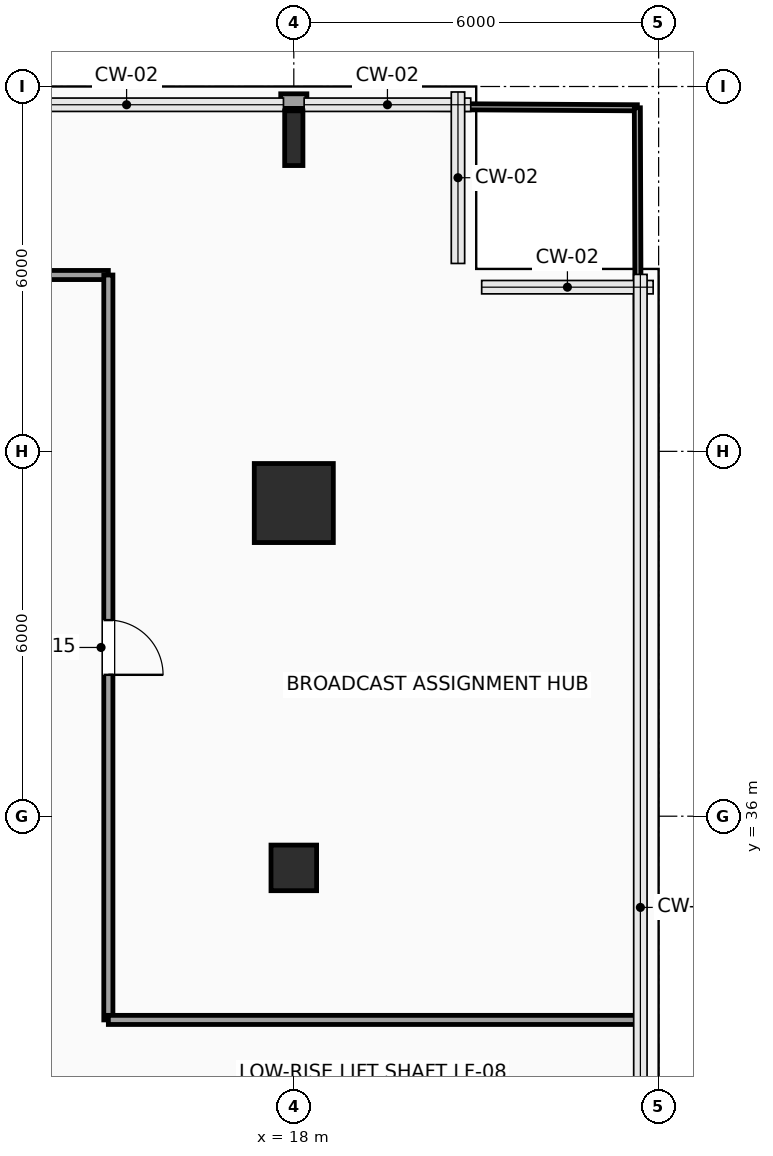
"""IFC4 building model, lengths in metres.
Left out: names, types, materials, properties, quantities, classifications, styles, units other than length and angle.
Written with IfcOpenShell. Run it as: python <this file> out.ifc"""

import sys

from ifc_helpers import new_model, si_unit, direction, frame, frame_2d, origin, origin_2d, place, context, subcontext, project, spatial, rectangle, hollow_rectangle, i_section, extrude, element, fill, save


model = new_model("IFC4")
c1 = context("Model", 3, precision=1e-05, world=origin(), true_north=direction((0.0, 1.0)))
c2 = subcontext(c1, "Body", "Model", "MODEL_VIEW")
j1 = project(units=[si_unit("LENGTHUNIT", "METRE"), si_unit("PLANEANGLEUNIT", "RADIAN")], contexts=[c1])
p1 = place(None, origin())
s1 = spatial("IfcSite", under=j1, at=p1, CompositionType="ELEMENT")
p2 = place(p1, origin())
s2 = spatial("IfcBuilding", under=s1, at=p2, CompositionType="ELEMENT")
p3 = place(p2, frame((0.0, 0.0, 36.3)))
s3 = spatial("IfcBuildingStorey", under=s2, at=p3, CompositionType="ELEMENT", Elevation=36.3)
p4 = place(p3, frame((18.0, 35.15, 0.0), z_axis=(0.0, 0.0, 1.0), x_axis=(1.0, 0.0, 0.0)))
e1 = element("IfcColumn", 1, at=p4, inside=s3, PredefinedType="COLUMN", context=c2, shape_type="SweptSolid", body=[
    extrude(hollow_rectangle(XDim=0.75, YDim=0.75, WallThickness=0.035, InnerFilletRadius=0.035, OuterFilletRadius=0.05, at=origin_2d()), origin(), (0.0, 0.0, 1.0), 3.9),
])
p5 = place(p3, frame((18.0, 41.15, 0.0), z_axis=(0.0, 0.0, 1.0), x_axis=(1.0, 0.0, 0.0)))
e2 = element("IfcColumn", 2, at=p5, inside=s3, PredefinedType="COLUMN", context=c2, shape_type="SweptSolid", body=[
    extrude(rectangle(XDim=1.3, YDim=1.3, at=origin_2d()), origin(), (0.0, 0.0, 1.0), 3.9),
])
p6 = place(p3, frame((18.0, 47.15, 0.0), z_axis=(0.0, 0.0, 1.0), x_axis=(1.0, 0.0, 0.0)))
e3 = element("IfcColumn", 3, at=p6, inside=s3, PredefinedType="COLUMN", context=c2, shape_type="SweptSolid", body=[
    extrude(i_section(OverallWidth=0.3, OverallDepth=0.9, WebThickness=0.019, FlangeThickness=0.035, FilletRadius=0.03, at=origin_2d()), origin(), (0.0, 0.0, 1.0), 3.9),
])
p7 = place(p3, frame((17.785, 47.76, 0.0), z_axis=(0.0, 0.0, 1.0), x_axis=(1.0, 0.0, 0.0)))
e4 = element("IfcWall", 4, at=p7, inside=s3, PredefinedType="SOLIDWALL", context=c2, shape_type="SweptSolid", body=[
    extrude(rectangle(XDim=0.43, YDim=0.24, at=frame_2d((0.215, 0.0))), origin(), (0.0, 0.0, 1.0), 3.65),
])
p8 = place(p3, frame((12.6, 44.9, 0.0), z_axis=(0.0, 0.0, 1.0), x_axis=(1.0, 0.0, 0.0)))
e5 = element("IfcWall", 5, at=p8, inside=s3, PredefinedType="PARTITIONING", context=c2, shape_type="SweptSolid", body=[
    extrude(rectangle(XDim=2.35, YDim=0.15, at=frame_2d((1.175, 0.0))), origin(), (0.0, 0.0, 1.0), 3.65),
])
p9 = place(p3, frame((14.95, 44.9, 0.0), z_axis=(0.0, 0.0, 1.0), x_axis=(0.0, -1.0, 0.0)))
e6 = element("IfcWall", 6, at=p9, inside=s3, PredefinedType="PARTITIONING", context=c2, shape_type="SweptSolid", body=[
    extrude(rectangle(XDim=12.25, YDim=0.15, at=frame_2d((6.125, 0.0))), origin(), (0.0, 0.0, 1.0), 3.65),
])
p10 = place(p9, frame((5.675, 0.0, 0.0)))
e7 = element("IfcOpeningElement", 7, at=p10, cuts=e6, PredefinedType="OPENING", context=c2, shape_type="SweptSolid", body=[
    extrude(rectangle(XDim=0.9, YDim=2.1, at=frame_2d((0.45, 1.05))), frame((0.0, 0.085, 0.0), z_axis=(0.0, -1.0, 0.0), x_axis=(1.0, 0.0, 0.0)), (0.0, 0.0, 1.0), 0.17),
])
p11 = place(p3, frame((14.95, 32.65, 0.0), z_axis=(0.0, 0.0, 1.0), x_axis=(1.0, 0.0, 0.0)))
e8 = element("IfcWall", 8, at=p11, inside=s3, PredefinedType="PARTITIONING", context=c2, shape_type="SweptSolid", body=[
    extrude(rectangle(XDim=8.75, YDim=0.15, at=frame_2d((4.375, 0.0))), origin(), (0.0, 0.0, 1.0), 3.65),
])
p12 = place(p3, frame((14.95, 47.7, 0.0), z_axis=(0.0, 0.0, 1.0), x_axis=(0.999983354582, -0.005769797172, 0.0)))
e9 = element("IfcWall", 9, at=p12, inside=s3, PredefinedType="PARTITIONING", context=c2, shape_type="SweptSolid", body=[
    extrude(rectangle(XDim=2.835, YDim=0.1, at=frame_2d((1.417, 0.0))), origin(), (0.0, 0.0, 1.0), 3.65),
])
p13 = place(p3, frame((18.215, 47.681, 0.0), z_axis=(0.0, 0.0, 1.0), x_axis=(0.999983469354, -0.005749871258, 0.0)))
e10 = element("IfcWall", 10, at=p13, inside=s3, PredefinedType="PARTITIONING", context=c2, shape_type="SweptSolid", body=[
    extrude(rectangle(XDim=5.435, YDim=0.1, at=frame_2d((2.717, 0.0))), origin(), (0.0, 0.0, 1.0), 3.65),
])
p14 = place(p3, frame((23.7, 32.65, 0.0), z_axis=(0.0, 0.0, 1.0), x_axis=(-0.003336569969, 0.999994433635, 0.0)))
e11 = element("IfcWall", 11, at=p14, inside=s3, PredefinedType="PARTITIONING", context=c2, shape_type="SweptSolid", body=[
    extrude(rectangle(XDim=15.0, YDim=0.1, at=frame_2d((7.5, 0.0))), origin(), (0.0, 0.0, 1.0), 3.65),
])
p15 = place(p10, origin())
e12 = element("IfcDoor", 12, at=p15, inside=s3, OperationType="SINGLE_SWING_RIGHT", PredefinedType="DOOR", context=c2, shape_type="SweptSolid", body=[
    extrude(rectangle(XDim=0.9, YDim=2.1, at=frame_2d((0.45, 1.05))), frame((0.0, 0.025, 0.0), z_axis=(0.0, -1.0, 0.0), x_axis=(1.0, 0.0, 0.0)), (0.0, 0.0, 1.0), 0.05),
])
fill(e7, e12)
save(model, sys.argv[1])
